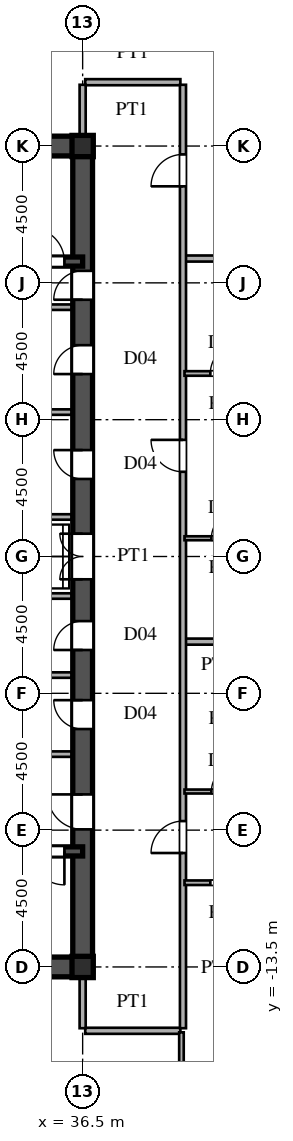
"""IFC4 building model, lengths in metres.
Left out: names, types, materials, properties, quantities, classifications, styles, units other than length and angle.
Written with IfcOpenShell. Run it as: python <this file> out.ifc"""

import sys

from ifc_helpers import new_model, si_unit, direction, frame, frame_2d, origin, origin_2d, place, context, subcontext, project, spatial, rectangle, i_section, extrude, source, transform, mapped, element, fill, save


model = new_model("IFC4")
c1 = context("Model", 3, precision=1e-05, world=origin(), true_north=direction((0.0, 1.0)))
c2 = subcontext(c1, "Body", "Model", "MODEL_VIEW")
j1 = project(units=[si_unit("LENGTHUNIT", "METRE"), si_unit("PLANEANGLEUNIT", "RADIAN")], contexts=[c1])
p1 = place(None, origin())
s1 = spatial("IfcSite", under=j1, at=p1, CompositionType="ELEMENT")
p2 = place(p1, origin())
s2 = spatial("IfcBuilding", under=s1, at=p2, CompositionType="ELEMENT")
p3 = place(p2, frame((0.0, 0.0, 117.6)))
s3 = spatial("IfcBuildingStorey", under=s2, at=p3, CompositionType="ELEMENT", Elevation=117.6)
m1 = source(origin(), c2, "Body", "SweptSolid", [
    extrude(i_section(OverallWidth=0.7, OverallDepth=0.7, WebThickness=0.028, FlangeThickness=0.045, at=origin_2d()), origin(), (0.0, 0.0, 1.0), 3.6),
])
for number, where, z_axis, x_axis in (
    (1, (36.5, -13.5, 0.0), (0.0, 0.0, 1.0), (1.0, 0.0, 0.0)),
    (2, (36.5, 13.5, 0.0), (0.0, 0.0, 1.0), (1.0, 0.0, 0.0)),
):
    element("IfcColumn", number, at=place(p3, frame(where, z_axis=z_axis, x_axis=x_axis)), inside=s3, PredefinedType="COLUMN", context=c2, shape_type="MappedRepresentation", body=[
        mapped(m1, transform((0.0, 0.0, 0.0), scale=1.0)),
    ])
for number, where, z_axis, x_axis in (
    (3, (27.5, -13.5, 0.0), (0.0, 0.0, 1.0), (1.0, 0.0, 0.0)),
    (4, (27.5, 13.5, 0.0), (0.0, 0.0, 1.0), (1.0, 0.0, 0.0)),
):
    element("IfcWall", number, at=place(p3, frame(where, z_axis=z_axis, x_axis=x_axis)), inside=s3, PredefinedType="SHEAR", context=c2, shape_type="SweptSolid", body=[
        extrude(rectangle(XDim=9.0, YDim=0.65, at=frame_2d((4.5, 0.0))), origin(), (0.0, 0.0, 1.0), 3.38),
    ])
p4 = place(p3, frame((36.5, -13.65, 0.0), z_axis=(0.0, 0.0, 1.0), x_axis=(0.0, 1.0, 0.0)))
e5 = element("IfcWall", 5, at=p4, inside=s3, PredefinedType="SHEAR", context=c2, shape_type="SweptSolid", body=[
    extrude(rectangle(XDim=7.15, YDim=0.65, at=frame_2d((3.575, 0.0))), origin(), (0.0, 0.0, 1.0), 3.38),
])
p5 = place(p4, frame((4.675, 0.0, 0.0)))
e6 = element("IfcOpeningElement", 6, at=p5, cuts=e5, PredefinedType="OPENING", context=c2, shape_type="SweptSolid", body=[
    extrude(rectangle(XDim=1.15, YDim=2.2, at=frame_2d((0.575, 1.1))), frame((0.0, 0.335, 0.0), z_axis=(0.0, -1.0, 0.0), x_axis=(1.0, 0.0, 0.0)), (0.0, 0.0, 1.0), 0.67),
])
p6 = place(p3, frame((36.5, -1.3, 0.0), z_axis=(0.0, 0.0, 1.0), x_axis=(0.0, 1.0, 0.0)))
e7 = element("IfcWall", 7, at=p6, inside=s3, PredefinedType="SHEAR", context=c2, shape_type="SweptSolid", body=[
    extrude(rectangle(XDim=2.6, YDim=0.65, at=frame_2d((1.3, 0.0))), origin(), (0.0, 0.0, 1.0), 3.38),
])
p7 = place(p6, frame((0.55, 0.0, 0.0)))
e8 = element("IfcOpeningElement", 8, at=p7, cuts=e7, PredefinedType="OPENING", context=c2, shape_type="SweptSolid", body=[
    extrude(rectangle(XDim=1.5, YDim=2.3, at=frame_2d((0.75, 1.15))), frame((0.0, 0.335, 0.0), z_axis=(0.0, -1.0, 0.0), x_axis=(1.0, 0.0, 0.0)), (0.0, 0.0, 1.0), 0.67),
])
p8 = place(p3, frame((36.5, 8.2, 0.0), z_axis=(0.0, 0.0, 1.0), x_axis=(0.0, 1.0, 0.0)))
e9 = element("IfcWall", 9, at=p8, inside=s3, PredefinedType="SHEAR", context=c2, shape_type="SweptSolid", body=[
    extrude(rectangle(XDim=5.45, YDim=0.65, at=frame_2d((2.725, 0.0))), origin(), (0.0, 0.0, 1.0), 3.38),
])
p9 = place(p8, frame((0.245, 0.0, 0.0)))
e10 = element("IfcOpeningElement", 10, at=p9, cuts=e9, PredefinedType="OPENING", context=c2, shape_type="SweptSolid", body=[
    extrude(rectangle(XDim=0.95, YDim=2.15, at=frame_2d((0.475, 1.075))), frame((0.0, 0.335, 0.0), z_axis=(0.0, -1.0, 0.0), x_axis=(1.0, 0.0, 0.0)), (0.0, 0.0, 1.0), 0.67),
])
p10 = place(p3, frame((36.5, -6.5, 0.0), z_axis=(0.0, 0.0, 1.0), x_axis=(0.0, 1.0, 0.0)))
e11 = element("IfcWall", 11, at=p10, inside=s3, PredefinedType="SHEAR", context=c2, shape_type="SweptSolid", body=[
    extrude(rectangle(XDim=2.6, YDim=0.65, at=frame_2d((1.3, 0.0))), origin(), (0.0, 0.0, 1.0), 3.38),
])
p11 = place(p10, frame((0.825, 0.0, 0.0)))
e12 = element("IfcOpeningElement", 12, at=p11, cuts=e11, PredefinedType="OPENING", context=c2, shape_type="SweptSolid", body=[
    extrude(rectangle(XDim=0.95, YDim=2.15, at=frame_2d((0.475, 1.075))), frame((0.0, 0.335, 0.0), z_axis=(0.0, -1.0, 0.0), x_axis=(1.0, 0.0, 0.0)), (0.0, 0.0, 1.0), 0.67),
])
p12 = place(p3, frame((36.5, -3.9, 0.0), z_axis=(0.0, 0.0, 1.0), x_axis=(0.0, 1.0, 0.0)))
e13 = element("IfcWall", 13, at=p12, inside=s3, PredefinedType="SHEAR", context=c2, shape_type="SweptSolid", body=[
    extrude(rectangle(XDim=2.6, YDim=0.65, at=frame_2d((1.3, 0.0))), origin(), (0.0, 0.0, 1.0), 3.38),
])
p13 = place(p12, frame((0.825, 0.0, 0.0)))
e14 = element("IfcOpeningElement", 14, at=p13, cuts=e13, PredefinedType="OPENING", context=c2, shape_type="SweptSolid", body=[
    extrude(rectangle(XDim=0.95, YDim=2.15, at=frame_2d((0.475, 1.075))), frame((0.0, 0.335, 0.0), z_axis=(0.0, -1.0, 0.0), x_axis=(1.0, 0.0, 0.0)), (0.0, 0.0, 1.0), 0.67),
])
p14 = place(p3, frame((36.5, 1.3, 0.0), z_axis=(0.0, 0.0, 1.0), x_axis=(0.0, 1.0, 0.0)))
e15 = element("IfcWall", 15, at=p14, inside=s3, PredefinedType="SHEAR", context=c2, shape_type="SweptSolid", body=[
    extrude(rectangle(XDim=3.45, YDim=0.65, at=frame_2d((1.725, 0.0))), origin(), (0.0, 0.0, 1.0), 3.38),
])
p15 = place(p14, frame((1.25, 0.0, 0.0)))
e16 = element("IfcOpeningElement", 16, at=p15, cuts=e15, PredefinedType="OPENING", context=c2, shape_type="SweptSolid", body=[
    extrude(rectangle(XDim=0.95, YDim=2.15, at=frame_2d((0.475, 1.075))), frame((0.0, 0.335, 0.0), z_axis=(0.0, -1.0, 0.0), x_axis=(1.0, 0.0, 0.0)), (0.0, 0.0, 1.0), 0.67),
])
p16 = place(p3, frame((36.5, 4.75, 0.0), z_axis=(0.0, 0.0, 1.0), x_axis=(0.0, 1.0, 0.0)))
e17 = element("IfcWall", 17, at=p16, inside=s3, PredefinedType="SHEAR", context=c2, shape_type="SweptSolid", body=[
    extrude(rectangle(XDim=3.45, YDim=0.65, at=frame_2d((1.725, 0.0))), origin(), (0.0, 0.0, 1.0), 3.38),
])
p17 = place(p16, frame((1.25, 0.0, 0.0)))
e18 = element("IfcOpeningElement", 18, at=p17, cuts=e17, PredefinedType="OPENING", context=c2, shape_type="SweptSolid", body=[
    extrude(rectangle(XDim=0.95, YDim=2.15, at=frame_2d((0.475, 1.075))), frame((0.0, 0.335, 0.0), z_axis=(0.0, -1.0, 0.0), x_axis=(1.0, 0.0, 0.0)), (0.0, 0.0, 1.0), 0.67),
])
p18 = place(p3, frame((27.5, -9.7, 0.0), z_axis=(0.0, 0.0, 1.0), x_axis=(1.0, 0.0, 0.0)))
e19 = element("IfcWall", 19, at=p18, inside=s3, PredefinedType="SHEAR", context=c2, shape_type="SweptSolid", body=[
    extrude(rectangle(XDim=9.0, YDim=0.3, at=frame_2d((4.5, 0.0))), origin(), (0.0, 0.0, 1.0), 3.38),
])
p19 = place(p18, frame((7.3, 0.0, 0.0)))
e20 = element("IfcOpeningElement", 20, at=p19, cuts=e19, PredefinedType="OPENING", context=c2, shape_type="SweptSolid", body=[
    extrude(rectangle(XDim=1.1, YDim=2.2, at=frame_2d((0.55, 1.1))), frame((0.0, 0.16, 0.0), z_axis=(0.0, -1.0, 0.0), x_axis=(1.0, 0.0, 0.0)), (0.0, 0.0, 1.0), 0.32),
])
p20 = place(p3, frame((27.5, 9.7, 0.0), z_axis=(0.0, 0.0, 1.0), x_axis=(1.0, 0.0, 0.0)))
e21 = element("IfcWall", 21, at=p20, inside=s3, PredefinedType="SHEAR", context=c2, shape_type="SweptSolid", body=[
    extrude(rectangle(XDim=9.0, YDim=0.3, at=frame_2d((4.5, 0.0))), origin(), (0.0, 0.0, 1.0), 3.38),
])
p21 = place(p20, frame((7.3, 0.0, 0.0)))
e22 = element("IfcOpeningElement", 22, at=p21, cuts=e21, PredefinedType="OPENING", context=c2, shape_type="SweptSolid", body=[
    extrude(rectangle(XDim=1.1, YDim=2.2, at=frame_2d((0.55, 1.1))), frame((0.0, 0.16, 0.0), z_axis=(0.0, -1.0, 0.0), x_axis=(1.0, 0.0, 0.0)), (0.0, 0.0, 1.0), 0.32),
])
for number, where, z_axis, x_axis in (
    (23, (30.45, -6.5, 0.0), (0.0, 0.0, 1.0), (1.0, 0.0, 0.0)),
    (24, (30.45, 8.2, 0.0), (0.0, 0.0, 1.0), (1.0, 0.0, 0.0)),
):
    element("IfcWall", number, at=place(p3, frame(where, z_axis=z_axis, x_axis=x_axis)), inside=s3, PredefinedType="PARTITIONING", context=c2, shape_type="SweptSolid", body=[
        extrude(rectangle(XDim=5.7, YDim=0.18, at=frame_2d((2.85, 0.0))), origin(), (0.0, 0.0, 1.0), 3.38),
    ])
for number, where, z_axis, x_axis in (
    (25, (33.2, -1.3, 0.0), (0.0, 0.0, 1.0), (1.0, 0.0, 0.0)),
    (26, (33.2, 1.3, 0.0), (0.0, 0.0, 1.0), (1.0, 0.0, 0.0)),
    (27, (33.2, -3.9, 0.0), (0.0, 0.0, 1.0), (1.0, 0.0, 0.0)),
    (28, (33.2, 4.75, 0.0), (0.0, 0.0, 1.0), (1.0, 0.0, 0.0)),
):
    element("IfcWall", number, at=place(p3, frame(where, z_axis=z_axis, x_axis=x_axis)), inside=s3, PredefinedType="PARTITIONING", context=c2, shape_type="SweptSolid", body=[
        extrude(rectangle(XDim=2.95, YDim=0.18, at=frame_2d((1.475, 0.0))), origin(), (0.0, 0.0, 1.0), 3.38),
    ])
p22 = place(p3, frame((36.585, -15.6, 0.0), z_axis=(0.0, 0.0, 1.0), x_axis=(1.0, 0.0, 0.0)))
e29 = element("IfcWall", 29, at=p22, inside=s3, PredefinedType="PARTITIONING", context=c2, shape_type="SweptSolid", body=[
    extrude(rectangle(XDim=3.13, YDim=0.2, at=frame_2d((1.565, 0.0))), origin(), (0.0, 0.0, 1.0), 3.38),
])
p23 = place(p3, frame((39.85, -10.73, 0.0), z_axis=(0.0, 0.0, 1.0), x_axis=(1.0, 0.0, 0.0)))
e30 = element("IfcWall", 30, at=p23, inside=s3, PredefinedType="PARTITIONING", context=c2, shape_type="SweptSolid", body=[
    extrude(rectangle(XDim=2.65, YDim=0.15, at=frame_2d((1.325, 0.0))), origin(), (0.0, 0.0, 1.0), 3.38),
])
p24 = place(p23, frame((0.85, 0.0, 0.0)))
e31 = element("IfcOpeningElement", 31, at=p24, cuts=e30, PredefinedType="OPENING", context=c2, shape_type="SweptSolid", body=[
    extrude(rectangle(XDim=0.95, YDim=2.15, at=frame_2d((0.475, 1.075))), frame((0.0, 0.085, 0.0), z_axis=(0.0, -1.0, 0.0), x_axis=(1.0, 0.0, 0.0)), (0.0, 0.0, 1.0), 0.17),
])
p25 = place(p3, frame((39.85, -7.73, 0.0), z_axis=(0.0, 0.0, 1.0), x_axis=(1.0, 0.0, 0.0)))
e32 = element("IfcWall", 32, at=p25, inside=s3, PredefinedType="PARTITIONING", context=c2, shape_type="SweptSolid", body=[
    extrude(rectangle(XDim=2.65, YDim=0.13, at=frame_2d((1.325, 0.0))), origin(), (0.0, 0.0, 1.0), 3.38),
])
p26 = place(p25, frame((0.885, 0.0, 0.0)))
e33 = element("IfcOpeningElement", 33, at=p26, cuts=e32, PredefinedType="OPENING", context=c2, shape_type="SweptSolid", body=[
    extrude(rectangle(XDim=0.88, YDim=2.1, at=frame_2d((0.44, 1.05))), frame((0.0, 0.075, 0.0), z_axis=(0.0, -1.0, 0.0), x_axis=(1.0, 0.0, 0.0)), (0.0, 0.0, 1.0), 0.15),
])
p27 = place(p3, frame((39.88, -2.8, 0.0), z_axis=(0.0, 0.0, 1.0), x_axis=(1.0, 0.0, 0.0)))
e34 = element("IfcWall", 34, at=p27, inside=s3, PredefinedType="PARTITIONING", context=c2, shape_type="SweptSolid", body=[
    extrude(rectangle(XDim=29.625, YDim=0.2, at=frame_2d((14.812, 0.0))), origin(), (0.0, 0.0, 1.0), 3.38),
])
p28 = place(p3, frame((39.85, 0.6, 0.0), z_axis=(0.0, 0.0, 1.0), x_axis=(1.0, 0.0, 0.0)))
e35 = element("IfcWall", 35, at=p28, inside=s3, PredefinedType="PARTITIONING", context=c2, shape_type="SweptSolid", body=[
    extrude(rectangle(XDim=2.65, YDim=0.13, at=frame_2d((1.325, 0.0))), origin(), (0.0, 0.0, 1.0), 3.38),
])
p29 = place(p28, frame((0.885, 0.0, 0.0)))
e36 = element("IfcOpeningElement", 36, at=p29, cuts=e35, PredefinedType="OPENING", context=c2, shape_type="SweptSolid", body=[
    extrude(rectangle(XDim=0.88, YDim=2.1, at=frame_2d((0.44, 1.05))), frame((0.0, 0.075, 0.0), z_axis=(0.0, -1.0, 0.0), x_axis=(1.0, 0.0, 0.0)), (0.0, 0.0, 1.0), 0.15),
])
p30 = place(p3, frame((39.85, 6.02, 0.0), z_axis=(0.0, 0.0, 1.0), x_axis=(1.0, 0.0, 0.0)))
e37 = element("IfcWall", 37, at=p30, inside=s3, PredefinedType="PARTITIONING", context=c2, shape_type="SweptSolid", body=[
    extrude(rectangle(XDim=2.65, YDim=0.15, at=frame_2d((1.325, 0.0))), origin(), (0.0, 0.0, 1.0), 3.38),
])
p31 = place(p30, frame((0.85, 0.0, 0.0)))
e38 = element("IfcOpeningElement", 38, at=p31, cuts=e37, PredefinedType="OPENING", context=c2, shape_type="SweptSolid", body=[
    extrude(rectangle(XDim=0.95, YDim=2.15, at=frame_2d((0.475, 1.075))), frame((0.0, 0.085, 0.0), z_axis=(0.0, -1.0, 0.0), x_axis=(1.0, 0.0, 0.0)), (0.0, 0.0, 1.0), 0.17),
])
p32 = place(p3, frame((39.88, 9.8, 0.0), z_axis=(0.0, 0.0, 1.0), x_axis=(1.0, 0.0, 0.0)))
e39 = element("IfcWall", 39, at=p32, inside=s3, PredefinedType="PARTITIONING", context=c2, shape_type="SweptSolid", body=[
    extrude(rectangle(XDim=20.277, YDim=0.2, at=frame_2d((10.139, 0.0))), origin(), (0.0, 0.0, 1.0), 3.38),
])
p33 = place(p3, frame((36.585, 15.6, 0.0), z_axis=(0.0, 0.0, 1.0), x_axis=(1.0, 0.0, 0.0)))
e40 = element("IfcWall", 40, at=p33, inside=s3, PredefinedType="PARTITIONING", context=c2, shape_type="SweptSolid", body=[
    extrude(rectangle(XDim=3.13, YDim=0.2, at=frame_2d((1.565, 0.0))), origin(), (0.0, 0.0, 1.0), 3.38),
])
for number, where, z_axis, x_axis in (
    (41, (36.5, -15.515, 0.0), (0.0, 0.0, 1.0), (0.0, 1.0, 0.0)),
    (42, (36.5, 13.83, 0.0), (0.0, 0.0, 1.0), (0.0, 1.0, 0.0)),
):
    element("IfcWall", number, at=place(p3, frame(where, z_axis=z_axis, x_axis=x_axis)), inside=s3, PredefinedType="PARTITIONING", context=c2, shape_type="SweptSolid", body=[
        extrude(rectangle(XDim=1.685, YDim=0.2, at=frame_2d((0.842, 0.0))), origin(), (0.0, 0.0, 1.0), 2.78),
    ])
p34 = place(p3, frame((39.75, -20.301, 0.0), z_axis=(0.0, 0.0, 1.0), x_axis=(0.0, 1.0, 0.0)))
e43 = element("IfcWall", 43, at=p34, inside=s3, PredefinedType="PARTITIONING", context=c2, shape_type="SweptSolid", body=[
    extrude(rectangle(XDim=4.651, YDim=0.15, at=frame_2d((2.326, 0.0))), origin(), (0.0, 0.0, 1.0), 3.38),
])
p35 = place(p34, frame((2.526, 0.0, 0.0)))
e44 = element("IfcOpeningElement", 44, at=p35, cuts=e43, PredefinedType="OPENING", context=c2, shape_type="SweptSolid", body=[
    extrude(rectangle(XDim=0.95, YDim=2.15, at=frame_2d((0.475, 1.075))), frame((0.0, 0.085, 0.0), z_axis=(0.0, -1.0, 0.0), x_axis=(1.0, 0.0, 0.0)), (0.0, 0.0, 1.0), 0.17),
])
p36 = place(p3, frame((39.8, -15.515, 0.0), z_axis=(0.0, 0.0, 1.0), x_axis=(0.0, 1.0, 0.0)))
e45 = element("IfcWall", 45, at=p36, inside=s3, PredefinedType="PARTITIONING", context=c2, shape_type="SweptSolid", body=[
    extrude(rectangle(XDim=31.03, YDim=0.2, at=frame_2d((15.515, 0.0))), origin(), (0.0, 0.0, 1.0), 3.38),
])
p37 = place(p36, frame((5.762, 0.0, 0.0)))
e46 = element("IfcOpeningElement", 46, at=p37, cuts=e45, PredefinedType="OPENING", context=c2, shape_type="SweptSolid", body=[
    extrude(rectangle(XDim=1.05, YDim=2.25, at=frame_2d((0.525, 1.125))), frame((0.0, 0.11, 0.0), z_axis=(0.0, -1.0, 0.0), x_axis=(1.0, 0.0, 0.0)), (0.0, 0.0, 1.0), 0.22),
])
p38 = place(p36, frame((18.301, 0.0, 0.0)))
e47 = element("IfcOpeningElement", 47, at=p38, cuts=e45, PredefinedType="OPENING", context=c2, shape_type="SweptSolid", body=[
    extrude(rectangle(XDim=1.05, YDim=2.25, at=frame_2d((0.525, 1.125))), frame((0.0, 0.11, 0.0), z_axis=(0.0, -1.0, 0.0), x_axis=(1.0, 0.0, 0.0)), (0.0, 0.0, 1.0), 0.22),
])
p39 = place(p36, frame((27.69, 0.0, 0.0)))
e48 = element("IfcOpeningElement", 48, at=p39, cuts=e45, PredefinedType="OPENING", context=c2, shape_type="SweptSolid", body=[
    extrude(rectangle(XDim=1.05, YDim=2.25, at=frame_2d((0.525, 1.125))), frame((0.0, 0.11, 0.0), z_axis=(0.0, -1.0, 0.0), x_axis=(1.0, 0.0, 0.0)), (0.0, 0.0, 1.0), 0.22),
])
m2 = source(origin(), c2, "Body", "SweptSolid", [
    extrude(rectangle(XDim=1.15, YDim=2.2, at=frame_2d((0.575, 1.1))), frame((0.0, 0.025, 0.0), z_axis=(0.0, -1.0, 0.0), x_axis=(1.0, 0.0, 0.0)), (0.0, 0.0, 1.0), 0.05),
])
p40 = place(p5, origin())
e49 = element("IfcDoor", 49, at=p40, inside=s3, OperationType="SINGLE_SWING_RIGHT", PredefinedType="DOOR", context=c2, shape_type="MappedRepresentation", body=[
    mapped(m2, transform((0.0, 0.0, 0.0), scale=1.0)),
])
fill(e6, e49)
m3 = source(origin(), c2, "Body", "SweptSolid", [
    extrude(rectangle(XDim=1.5, YDim=2.3, at=frame_2d((0.75, 1.15))), frame((0.0, 0.025, 0.0), z_axis=(0.0, -1.0, 0.0), x_axis=(1.0, 0.0, 0.0)), (0.0, 0.0, 1.0), 0.05),
])
p41 = place(p7, origin())
e50 = element("IfcDoor", 50, at=p41, inside=s3, OperationType="DOUBLE_SWING_LEFT", PredefinedType="DOOR", context=c2, shape_type="MappedRepresentation", body=[
    mapped(m3, transform((0.0, 0.0, 0.0), scale=1.0)),
])
fill(e8, e50)
m4 = source(origin(), c2, "Body", "SweptSolid", [
    extrude(rectangle(XDim=0.95, YDim=2.15, at=frame_2d((0.475, 1.075))), frame((0.0, 0.025, 0.0), z_axis=(0.0, -1.0, 0.0), x_axis=(1.0, 0.0, 0.0)), (0.0, 0.0, 1.0), 0.05),
])
p42 = place(p9, origin())
e51 = element("IfcDoor", 51, at=p42, inside=s3, OperationType="SINGLE_SWING_LEFT", PredefinedType="DOOR", context=c2, shape_type="MappedRepresentation", body=[
    mapped(m4, transform((0.0, 0.0, 0.0), scale=1.0)),
])
fill(e10, e51)
p43 = place(p11, origin())
e52 = element("IfcDoor", 52, at=p43, inside=s3, OperationType="SINGLE_SWING_RIGHT", PredefinedType="DOOR", context=c2, shape_type="MappedRepresentation", body=[
    mapped(m4, transform((0.0, 0.0, 0.0), scale=1.0)),
])
fill(e12, e52)
p44 = place(p13, origin())
e53 = element("IfcDoor", 53, at=p44, inside=s3, OperationType="SINGLE_SWING_LEFT", PredefinedType="DOOR", context=c2, shape_type="MappedRepresentation", body=[
    mapped(m4, transform((0.0, 0.0, 0.0), scale=1.0)),
])
fill(e14, e53)
p45 = place(p15, origin())
e54 = element("IfcDoor", 54, at=p45, inside=s3, OperationType="SINGLE_SWING_RIGHT", PredefinedType="DOOR", context=c2, shape_type="MappedRepresentation", body=[
    mapped(m4, transform((0.0, 0.0, 0.0), scale=1.0)),
])
fill(e16, e54)
p46 = place(p17, origin())
e55 = element("IfcDoor", 55, at=p46, inside=s3, OperationType="SINGLE_SWING_LEFT", PredefinedType="DOOR", context=c2, shape_type="MappedRepresentation", body=[
    mapped(m4, transform((0.0, 0.0, 0.0), scale=1.0)),
])
fill(e18, e55)
m5 = source(origin(), c2, "Body", "SweptSolid", [
    extrude(rectangle(XDim=1.1, YDim=2.2, at=frame_2d((0.55, 1.1))), frame((0.0, 0.025, 0.0), z_axis=(0.0, -1.0, 0.0), x_axis=(1.0, 0.0, 0.0)), (0.0, 0.0, 1.0), 0.05),
])
p47 = place(p19, frame((1.1, 0.0, 0.0), z_axis=(0.0, 0.0, 1.0), x_axis=(-1.0, 0.0, 0.0)))
e56 = element("IfcDoor", 56, at=p47, inside=s3, OperationType="SINGLE_SWING_RIGHT", PredefinedType="DOOR", context=c2, shape_type="MappedRepresentation", body=[
    mapped(m5, transform((0.0, 0.0, 0.0), scale=1.0)),
])
fill(e20, e56)
p48 = place(p21, origin())
e57 = element("IfcDoor", 57, at=p48, inside=s3, OperationType="SINGLE_SWING_LEFT", PredefinedType="DOOR", context=c2, shape_type="MappedRepresentation", body=[
    mapped(m5, transform((0.0, 0.0, 0.0), scale=1.0)),
])
fill(e22, e57)
m6 = source(origin(), c2, "Body", "SweptSolid", [
    extrude(rectangle(XDim=0.88, YDim=2.1, at=frame_2d((0.44, 1.05))), frame((0.0, 0.025, 0.0), z_axis=(0.0, -1.0, 0.0), x_axis=(1.0, 0.0, 0.0)), (0.0, 0.0, 1.0), 0.05),
])
p49 = place(p26, origin())
e58 = element("IfcDoor", 58, at=p49, inside=s3, OperationType="SINGLE_SWING_RIGHT", PredefinedType="DOOR", context=c2, shape_type="MappedRepresentation", body=[
    mapped(m6, transform((0.0, 0.0, 0.0), scale=1.0)),
])
fill(e33, e58)
p50 = place(p29, origin())
e59 = element("IfcDoor", 59, at=p50, inside=s3, OperationType="SINGLE_SWING_RIGHT", PredefinedType="DOOR", context=c2, shape_type="MappedRepresentation", body=[
    mapped(m6, transform((0.0, 0.0, 0.0), scale=1.0)),
])
fill(e36, e59)
m7 = source(origin(), c2, "Body", "SweptSolid", [
    extrude(rectangle(XDim=0.95, YDim=2.15, at=frame_2d((0.475, 1.075))), frame((0.0, 0.025, 0.0), z_axis=(0.0, -1.0, 0.0), x_axis=(1.0, 0.0, 0.0)), (0.0, 0.0, 1.0), 0.05),
])
p51 = place(p31, origin())
e60 = element("IfcDoor", 60, at=p51, inside=s3, OperationType="SINGLE_SWING_RIGHT", PredefinedType="DOOR", context=c2, shape_type="MappedRepresentation", body=[
    mapped(m7, transform((0.0, 0.0, 0.0), scale=1.0)),
])
fill(e38, e60)
m8 = source(origin(), c2, "Body", "SweptSolid", [
    extrude(rectangle(XDim=1.05, YDim=2.25, at=frame_2d((0.525, 1.125))), frame((0.0, 0.025, 0.0), z_axis=(0.0, -1.0, 0.0), x_axis=(1.0, 0.0, 0.0)), (0.0, 0.0, 1.0), 0.05),
])
p52 = place(p37, origin())
e61 = element("IfcDoor", 61, at=p52, inside=s3, OperationType="SINGLE_SWING_LEFT", PredefinedType="DOOR", context=c2, shape_type="MappedRepresentation", body=[
    mapped(m8, transform((0.0, 0.0, 0.0), scale=1.0)),
])
fill(e46, e61)
p53 = place(p38, origin())
e62 = element("IfcDoor", 62, at=p53, inside=s3, OperationType="SINGLE_SWING_RIGHT", PredefinedType="DOOR", context=c2, shape_type="MappedRepresentation", body=[
    mapped(m8, transform((0.0, 0.0, 0.0), scale=1.0)),
])
fill(e47, e62)
p54 = place(p39, origin())
e63 = element("IfcDoor", 63, at=p54, inside=s3, OperationType="SINGLE_SWING_LEFT", PredefinedType="DOOR", context=c2, shape_type="MappedRepresentation", body=[
    mapped(m8, transform((0.0, 0.0, 0.0), scale=1.0)),
])
fill(e48, e63)
save(model, sys.argv[1])
